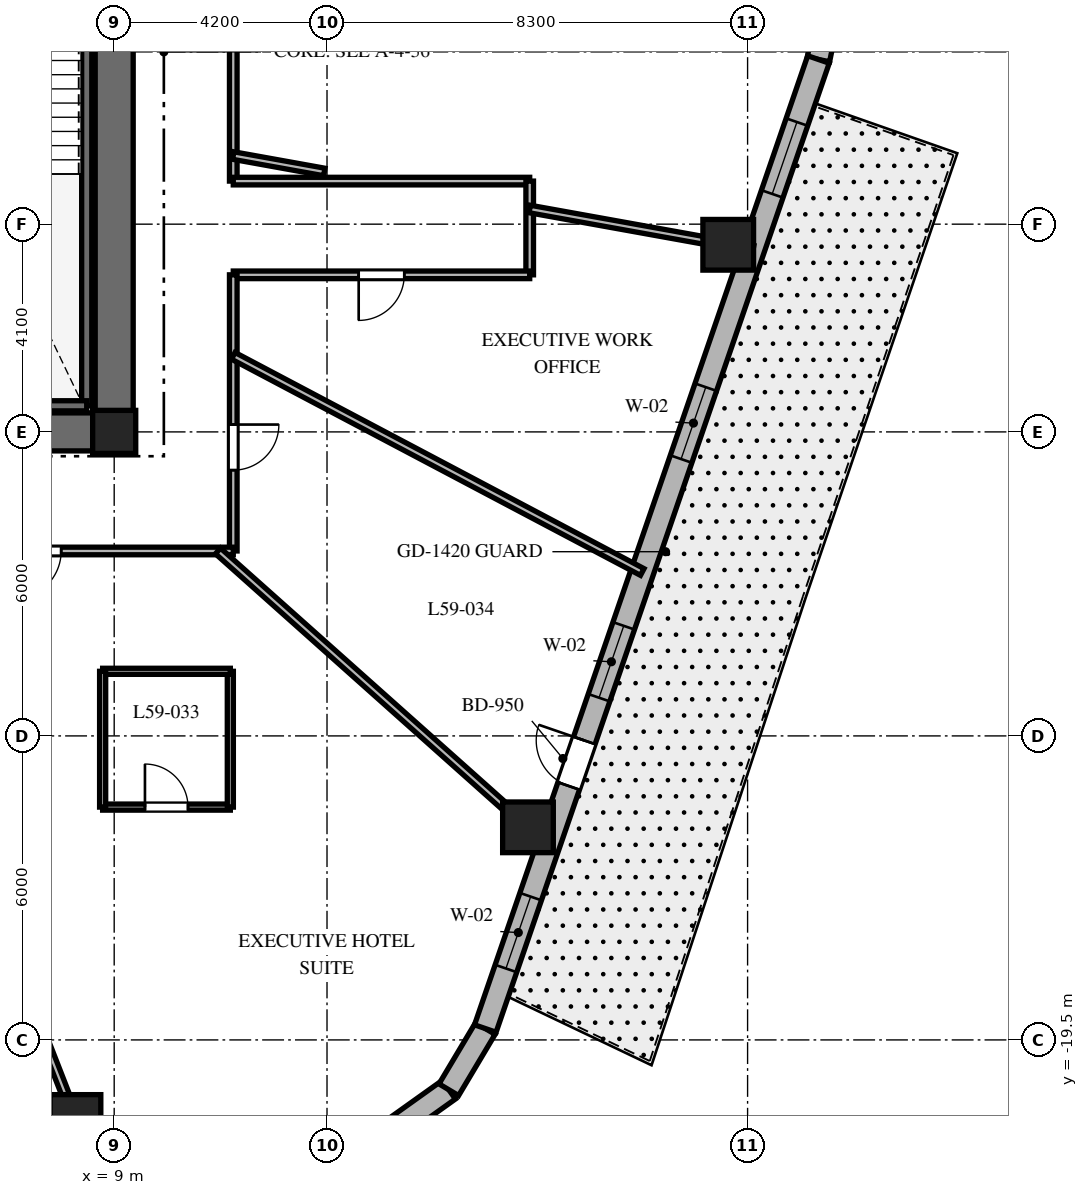
"""IFC4 building model, lengths in metres.
Left out: names, types, materials, properties, quantities, classifications, styles, units other than length and angle.
Written with IfcOpenShell. Run it as: python <this file> out.ifc"""

import sys

from ifc_helpers import new_model, si_unit, direction, frame, frame_2d, origin, origin_2d, place, context, subcontext, project, spatial, rectangle, extrude, element, fill, save


model = new_model("IFC4")
c1 = context("Model", 3, precision=1e-05, world=origin(), true_north=direction((0.0, 1.0)))
c2 = subcontext(c1, "Body", "Model", "MODEL_VIEW")
j1 = project(units=[si_unit("LENGTHUNIT", "METRE"), si_unit("PLANEANGLEUNIT", "RADIAN")], contexts=[c1])
p1 = place(None, origin())
s1 = spatial("IfcSite", under=j1, at=p1, CompositionType="ELEMENT")
p2 = place(p1, origin())
s2 = spatial("IfcBuilding", under=s1, at=p2, CompositionType="ELEMENT")
p3 = place(p2, frame((0.0, 0.0, 236.9)))
s3 = spatial("IfcBuildingStorey", under=s2, at=p3, CompositionType="ELEMENT", Elevation=236.9)
p4 = place(p3, frame((-9.375, -7.5, 0.0), z_axis=(0.0, 0.0, 1.0), x_axis=(1.0, 0.0, 0.0)))
e1 = element("IfcWall", 1, at=p4, inside=s3, PredefinedType="SHEAR", context=c2, shape_type="SweptSolid", body=[
    extrude(rectangle(XDim=18.75, YDim=0.75, at=frame_2d((9.375, 0.0))), origin(), (0.0, 0.0, 1.0), 3.8),
])
p5 = place(p4, frame((9.425, 0.0, 0.0)))
e2 = element("IfcOpeningElement", 2, at=p5, cuts=e1, PredefinedType="OPENING", context=c2, shape_type="SweptSolid", body=[
    extrude(rectangle(XDim=1.0, YDim=2.15, at=frame_2d((0.5, 1.075))), frame((0.0, 0.385, 0.0), z_axis=(0.0, -1.0, 0.0), x_axis=(1.0, 0.0, 0.0)), (0.0, 0.0, 1.0), 0.77),
])
p6 = place(p3, frame((9.0, -7.125, 0.0), z_axis=(0.0, 0.0, 1.0), x_axis=(0.0, 1.0, 0.0)))
e3 = element("IfcWall", 3, at=p6, inside=s3, PredefinedType="SHEAR", context=c2, shape_type="SweptSolid", body=[
    extrude(rectangle(XDim=14.25, YDim=0.75, at=frame_2d((7.125, 0.0))), origin(), (0.0, 0.0, 1.0), 3.8),
])
p7 = place(p6, frame((10.25, 0.0, 0.0)))
e4 = element("IfcOpeningElement", 4, at=p7, cuts=e3, PredefinedType="OPENING", context=c2, shape_type="SweptSolid", body=[
    extrude(rectangle(XDim=1.05, YDim=2.15, at=frame_2d((0.525, 1.075))), frame((0.0, 0.385, 0.0), z_axis=(0.0, -1.0, 0.0), x_axis=(1.0, 0.0, 0.0)), (0.0, 0.0, 1.0), 0.77),
])
p8 = place(p3, frame((8.458, -6.985, 0.0), z_axis=(0.0, 0.0, 1.0), x_axis=(0.0, 1.0, 0.0)))
e5 = element("IfcWall", 5, at=p8, inside=s3, PredefinedType="SHEAR", context=c2, shape_type="SweptSolid", body=[
    extrude(rectangle(XDim=9.143, YDim=0.2, at=frame_2d((4.572, 0.0))), origin(), (0.0, 0.0, 1.0), 3.8),
])
p9 = place(p3, frame((4.772, -6.985, 0.0), z_axis=(0.0, 0.0, 1.0), x_axis=(1.0, 0.0, 0.0)))
e6 = element("IfcWall", 6, at=p9, inside=s3, PredefinedType="SHEAR", context=c2, shape_type="SweptSolid", body=[
    extrude(rectangle(XDim=3.686, YDim=0.2, at=frame_2d((1.843, 0.0))), origin(), (0.0, 0.0, 1.0), 3.8),
])
p10 = place(p3, frame((9.0, -7.5, 0.0), z_axis=(0.0, 0.0, 1.0), x_axis=(1.0, 0.0, 0.0)))
e7 = element("IfcColumn", 7, at=p10, inside=s3, PredefinedType="COLUMN", context=c2, shape_type="SweptSolid", body=[
    extrude(rectangle(XDim=0.85, YDim=0.85, at=origin_2d()), origin(), (0.0, 0.0, 1.0), 3.8),
])
for number, where, z_axis, x_axis in (
    (8, (8.236, -21.08, 0.0), (0.0, 0.0, 1.0), (1.0, 0.0, 0.0)),
    (9, (17.166, -15.304, 0.0), (0.0, 0.0, 1.0), (1.0, 0.0, 0.0)),
    (10, (21.118, -3.807, 0.0), (0.0, 0.0, 1.0), (1.0, 0.0, 0.0)),
):
    element("IfcColumn", number, at=place(p3, frame(where, z_axis=z_axis, x_axis=x_axis)), inside=s3, PredefinedType="COLUMN", context=c2, shape_type="SweptSolid", body=[
        extrude(rectangle(XDim=1.0, YDim=1.0, at=origin_2d()), origin(), (0.0, 0.0, 1.0), 3.8),
    ])
p11 = place(p3, frame((14.478, -21.287, 0.0), z_axis=(0.0, 0.0, 1.0), x_axis=(0.813888518617, 0.58102106611, 0.0)))
e11 = element("IfcWall", 11, at=p11, inside=s3, PredefinedType="SOLIDWALL", context=c2, shape_type="SweptSolid", body=[
    extrude(rectangle(XDim=1.383, YDim=0.45, at=frame_2d((0.691, 0.0))), origin(), (0.0, 0.0, 1.0), 3.5),
])
p12 = place(p3, frame((15.604, -20.483, 0.0), z_axis=(0.0, 0.0, 1.0), x_axis=(0.512222149036, 0.858852996756, 0.0)))
e12 = element("IfcWall", 12, at=p12, inside=s3, PredefinedType="SOLIDWALL", context=c2, shape_type="SweptSolid", body=[
    extrude(rectangle(XDim=1.406, YDim=0.45, at=frame_2d((0.703, 0.0))), origin(), (0.0, 0.0, 1.0), 3.5),
])
p13 = place(p3, frame((22.898, -0.15, 0.0), z_axis=(0.0, 0.0, 1.0), x_axis=(0.199055826889, 0.979988151858, 0.0)))
e13 = element("IfcWall", 13, at=p13, inside=s3, PredefinedType="SOLIDWALL", context=c2, shape_type="SweptSolid", body=[
    extrude(rectangle(XDim=0.894, YDim=0.45, at=frame_2d((0.447, 0.0))), origin(), (0.0, 0.0, 1.0), 3.5),
])
p14 = place(p3, frame((16.324, -19.275, 0.0), z_axis=(0.0, 0.0, 1.0), x_axis=(0.325083142304, 0.945685439557, 0.0)))
e14 = element("IfcWall", 14, at=p14, inside=s3, PredefinedType="SOLIDWALL", context=c2, shape_type="SweptSolid", body=[
    extrude(rectangle(XDim=20.224, YDim=0.45, at=frame_2d((10.112, 0.0))), origin(), (0.0, 0.0, 1.0), 3.5),
])
p15 = place(p14, frame((5.062, 0.0, 0.0)))
e15 = element("IfcOpeningElement", 15, at=p15, cuts=e14, PredefinedType="OPENING", context=c2, shape_type="SweptSolid", body=[
    extrude(rectangle(XDim=0.95, YDim=2.15, at=frame_2d((0.475, 1.075))), frame((0.0, 0.235, 0.0), z_axis=(0.0, -1.0, 0.0), x_axis=(1.0, 0.0, 0.0)), (0.0, 0.0, 1.0), 0.47),
])
p16 = place(p14, frame((1.253, 0.0, 0.8)))
e16 = element("IfcOpeningElement", 16, at=p16, cuts=e14, PredefinedType="OPENING", context=c2, shape_type="SweptSolid", body=[
    extrude(rectangle(XDim=1.5, YDim=1.8, at=frame_2d((0.75, 0.9))), frame((0.0, 0.235, 0.0), z_axis=(0.0, -1.0, 0.0), x_axis=(1.0, 0.0, 0.0)), (0.0, 0.0, 1.0), 0.47),
])
p17 = place(p14, frame((6.904, 0.0, 0.8)))
e17 = element("IfcOpeningElement", 17, at=p17, cuts=e14, PredefinedType="OPENING", context=c2, shape_type="SweptSolid", body=[
    extrude(rectangle(XDim=1.5, YDim=1.8, at=frame_2d((0.75, 0.9))), frame((0.0, 0.235, 0.0), z_axis=(0.0, -1.0, 0.0), x_axis=(1.0, 0.0, 0.0)), (0.0, 0.0, 1.0), 0.47),
])
p18 = place(p14, frame((11.885, 0.0, 0.8)))
e18 = element("IfcOpeningElement", 18, at=p18, cuts=e14, PredefinedType="OPENING", context=c2, shape_type="SweptSolid", body=[
    extrude(rectangle(XDim=1.5, YDim=1.8, at=frame_2d((0.75, 0.9))), frame((0.0, 0.235, 0.0), z_axis=(0.0, -1.0, 0.0), x_axis=(1.0, 0.0, 0.0)), (0.0, 0.0, 1.0), 0.47),
])
p19 = place(p14, frame((17.418, 0.0, 0.8)))
e19 = element("IfcOpeningElement", 19, at=p19, cuts=e14, PredefinedType="OPENING", context=c2, shape_type="SweptSolid", body=[
    extrude(rectangle(XDim=1.5, YDim=1.8, at=frame_2d((0.75, 0.9))), frame((0.0, 0.235, 0.0), z_axis=(0.0, -1.0, 0.0), x_axis=(1.0, 0.0, 0.0)), (0.0, 0.0, 1.0), 0.47),
])
p20 = place(p3, frame((11.35, 9.85, 0.0), z_axis=(0.0, 0.0, 1.0), x_axis=(0.0, -1.0, 0.0)))
e20 = element("IfcWall", 20, at=p20, inside=s3, PredefinedType="PARTITIONING", context=c2, shape_type="SweptSolid", body=[
    extrude(rectangle(XDim=12.4, YDim=0.15, at=frame_2d((6.2, 0.0))), origin(), (0.0, 0.0, 1.0), 2.99),
])
p21 = place(p20, frame((4.191, 0.0, 0.0)))
e21 = element("IfcOpeningElement", 21, at=p21, cuts=e20, PredefinedType="OPENING", context=c2, shape_type="SweptSolid", body=[
    extrude(rectangle(XDim=0.95, YDim=2.03, at=frame_2d((0.475, 1.015))), frame((0.0, 0.085, 0.0), z_axis=(0.0, -1.0, 0.0), x_axis=(1.0, 0.0, 0.0)), (0.0, 0.0, 1.0), 0.17),
])
p22 = place(p20, frame((0.994, 0.0, 0.0)))
e22 = element("IfcOpeningElement", 22, at=p22, cuts=e20, PredefinedType="OPENING", context=c2, shape_type="SweptSolid", body=[
    extrude(rectangle(XDim=0.9, YDim=2.03, at=frame_2d((0.45, 1.015))), frame((0.0, 0.085, 0.0), z_axis=(0.0, -1.0, 0.0), x_axis=(1.0, 0.0, 0.0)), (0.0, 0.0, 1.0), 0.17),
])
p23 = place(p20, frame((8.835, 0.0, 0.0)))
e23 = element("IfcOpeningElement", 23, at=p23, cuts=e20, PredefinedType="OPENING", context=c2, shape_type="SweptSolid", body=[
    extrude(rectangle(XDim=0.95, YDim=2.03, at=frame_2d((0.475, 1.015))), frame((0.0, 0.085, 0.0), z_axis=(0.0, -1.0, 0.0), x_axis=(1.0, 0.0, 0.0)), (0.0, 0.0, 1.0), 0.17),
])
p24 = place(p3, frame((11.35, -2.55, 0.0), z_axis=(0.0, 0.0, 1.0), x_axis=(1.0, 0.0, 0.0)))
e24 = element("IfcWall", 24, at=p24, inside=s3, PredefinedType="PARTITIONING", context=c2, shape_type="SweptSolid", body=[
    extrude(rectangle(XDim=5.85, YDim=0.15, at=frame_2d((2.925, 0.0))), origin(), (0.0, 0.0, 1.0), 2.941),
])
p25 = place(p3, frame((17.2, -2.55, 0.0), z_axis=(0.0, 0.0, 1.0), x_axis=(0.0, -1.0, 0.0)))
e25 = element("IfcWall", 25, at=p25, inside=s3, PredefinedType="PARTITIONING", context=c2, shape_type="SweptSolid", body=[
    extrude(rectangle(XDim=1.85, YDim=0.15, at=frame_2d((0.925, 0.0))), origin(), (0.0, 0.0, 1.0), 2.941),
])
p26 = place(p3, frame((17.2, -4.4, 0.0), z_axis=(0.0, 0.0, 1.0), x_axis=(-1.0, 0.0, 0.0)))
e26 = element("IfcWall", 26, at=p26, inside=s3, PredefinedType="PARTITIONING", context=c2, shape_type="SweptSolid", body=[
    extrude(rectangle(XDim=5.85, YDim=0.15, at=frame_2d((2.925, 0.0))), origin(), (0.0, 0.0, 1.0), 2.941),
])
p27 = place(p26, frame((2.475, 0.0, 0.0)))
e27 = element("IfcOpeningElement", 27, at=p27, cuts=e26, PredefinedType="OPENING", context=c2, shape_type="SweptSolid", body=[
    extrude(rectangle(XDim=0.9, YDim=2.03, at=frame_2d((0.45, 1.015))), frame((0.0, 0.085, 0.0), z_axis=(0.0, -1.0, 0.0), x_axis=(1.0, 0.0, 0.0)), (0.0, 0.0, 1.0), 0.17),
])
p28 = place(p3, frame((11.35, -4.4, 0.0), z_axis=(0.0, 0.0, 1.0), x_axis=(0.0, -1.0, 0.0)))
e28 = element("IfcWall", 28, at=p28, inside=s3, PredefinedType="PARTITIONING", context=c2, shape_type="SweptSolid", body=[
    extrude(rectangle(XDim=5.45, YDim=0.15, at=frame_2d((2.725, 0.0))), origin(), (0.0, 0.0, 1.0), 2.99),
])
p29 = place(p28, frame((2.955, 0.0, 0.0)))
e29 = element("IfcOpeningElement", 29, at=p29, cuts=e28, PredefinedType="OPENING", context=c2, shape_type="SweptSolid", body=[
    extrude(rectangle(XDim=0.9, YDim=2.03, at=frame_2d((0.45, 1.015))), frame((0.0, 0.085, 0.0), z_axis=(0.0, -1.0, 0.0), x_axis=(1.0, 0.0, 0.0)), (0.0, 0.0, 1.0), 0.17),
])
p30 = place(p3, frame((11.35, -9.85, 0.0), z_axis=(0.0, 0.0, 1.0), x_axis=(-1.0, 0.0, 0.0)))
e30 = element("IfcWall", 30, at=p30, inside=s3, PredefinedType="PARTITIONING", context=c2, shape_type="SweptSolid", body=[
    extrude(rectangle(XDim=10.43, YDim=0.15, at=frame_2d((5.215, 0.0))), origin(), (0.0, 0.0, 1.0), 2.99),
])
p31 = place(p30, frame((8.362, 0.0, 0.0)))
e31 = element("IfcOpeningElement", 31, at=p31, cuts=e30, PredefinedType="OPENING", context=c2, shape_type="SweptSolid", body=[
    extrude(rectangle(XDim=0.95, YDim=2.03, at=frame_2d((0.475, 1.015))), frame((0.0, 0.085, 0.0), z_axis=(0.0, -1.0, 0.0), x_axis=(1.0, 0.0, 0.0)), (0.0, 0.0, 1.0), 0.17),
])
p32 = place(p30, frame((3.396, 0.0, 0.0)))
e32 = element("IfcOpeningElement", 32, at=p32, cuts=e30, PredefinedType="OPENING", context=c2, shape_type="SweptSolid", body=[
    extrude(rectangle(XDim=0.95, YDim=2.03, at=frame_2d((0.475, 1.015))), frame((0.0, 0.085, 0.0), z_axis=(0.0, -1.0, 0.0), x_axis=(1.0, 0.0, 0.0)), (0.0, 0.0, 1.0), 0.17),
])
p33 = place(p3, frame((3.848, -9.85, 0.0), z_axis=(0.0, 0.0, 1.0), x_axis=(0.363921778212, -0.931429513889, 0.0)))
e33 = element("IfcWall", 33, at=p33, inside=s3, PredefinedType="PARTITIONING", context=c2, shape_type="SweptSolid", body=[
    extrude(rectangle(XDim=12.588, YDim=0.15, at=frame_2d((6.294, 0.0))), origin(), (0.0, 0.0, 1.0), 2.74),
])
p34 = place(p3, frame((11.048, -9.85, 0.0), z_axis=(0.0, 0.0, 1.0), x_axis=(0.746444434655, -0.665447748492, 0.0)))
e34 = element("IfcWall", 34, at=p34, inside=s3, PredefinedType="PARTITIONING", context=c2, shape_type="SweptSolid", body=[
    extrude(rectangle(XDim=8.732, YDim=0.15, at=frame_2d((4.366, 0.0))), origin(), (0.0, 0.0, 1.0), 2.74),
])
p35 = place(p3, frame((11.35, -5.999, 0.0), z_axis=(0.0, 0.0, 1.0), x_axis=(0.884112301724, -0.467274478161, 0.0)))
e35 = element("IfcWall", 35, at=p35, inside=s3, PredefinedType="PARTITIONING", context=c2, shape_type="SweptSolid", body=[
    extrude(rectangle(XDim=9.129, YDim=0.15, at=frame_2d((4.564, 0.0))), origin(), (0.0, 0.0, 1.0), 2.74),
])
p36 = place(p3, frame((11.35, -2.046, 0.0), z_axis=(0.0, 0.0, 1.0), x_axis=(0.984127783205, -0.177461281195, 0.0)))
e36 = element("IfcWall", 36, at=p36, inside=s3, PredefinedType="PARTITIONING", context=c2, shape_type="SweptSolid", body=[
    extrude(rectangle(XDim=1.826, YDim=0.15, at=frame_2d((0.913, 0.0))), origin(), (0.0, 0.0, 1.0), 3.5),
])
p37 = place(p3, frame((17.2, -3.101, 0.0), z_axis=(0.0, 0.0, 1.0), x_axis=(0.98413465883, -0.177423147559, 0.0)))
e37 = element("IfcWall", 37, at=p37, inside=s3, PredefinedType="PARTITIONING", context=c2, shape_type="SweptSolid", body=[
    extrude(rectangle(XDim=4.482, YDim=0.15, at=frame_2d((2.241, 0.0))), origin(), (0.0, 0.0, 1.0), 2.74),
])
p38 = place(p3, frame((8.772, -14.905, 0.0), z_axis=(0.0, 0.0, 1.0), x_axis=(1.0, 0.0, 0.0)))
e38 = element("IfcWall", 38, at=p38, inside=s3, PredefinedType="PARTITIONING", context=c2, shape_type="SweptSolid", body=[
    extrude(rectangle(XDim=2.52, YDim=0.12, at=frame_2d((1.26, 0.0))), origin(), (0.0, 0.0, 1.0), 3.027),
])
p39 = place(p38, frame((0.835, 0.0, 0.0)))
e39 = element("IfcOpeningElement", 39, at=p39, cuts=e38, PredefinedType="OPENING", context=c2, shape_type="SweptSolid", body=[
    extrude(rectangle(XDim=0.85, YDim=2.03, at=frame_2d((0.425, 1.015))), frame((0.0, 0.07, 0.0), z_axis=(0.0, -1.0, 0.0), x_axis=(1.0, 0.0, 0.0)), (0.0, 0.0, 1.0), 0.14),
])
p40 = place(p3, frame((11.292, -14.905, 0.0), z_axis=(0.0, 0.0, 1.0), x_axis=(0.0, 1.0, 0.0)))
e40 = element("IfcWall", 40, at=p40, inside=s3, PredefinedType="PARTITIONING", context=c2, shape_type="SweptSolid", body=[
    extrude(rectangle(XDim=2.68, YDim=0.12, at=frame_2d((1.34, 0.0))), origin(), (0.0, 0.0, 1.0), 3.027),
])
p41 = place(p3, frame((11.292, -12.225, 0.0), z_axis=(0.0, 0.0, 1.0), x_axis=(-1.0, 0.0, 0.0)))
e41 = element("IfcWall", 41, at=p41, inside=s3, PredefinedType="PARTITIONING", context=c2, shape_type="SweptSolid", body=[
    extrude(rectangle(XDim=2.52, YDim=0.12, at=frame_2d((1.26, 0.0))), origin(), (0.0, 0.0, 1.0), 2.99),
])
p42 = place(p3, frame((8.772, -12.225, 0.0), z_axis=(0.0, 0.0, 1.0), x_axis=(0.0, -1.0, 0.0)))
e42 = element("IfcWall", 42, at=p42, inside=s3, PredefinedType="PARTITIONING", context=c2, shape_type="SweptSolid", body=[
    extrude(rectangle(XDim=2.68, YDim=0.12, at=frame_2d((1.34, 0.0))), origin(), (0.0, 0.0, 1.0), 2.99),
])
p43 = place(p15, origin())
e43 = element("IfcDoor", 43, at=p43, inside=s3, OperationType="SINGLE_SWING_RIGHT", PredefinedType="DOOR", context=c2, shape_type="SweptSolid", body=[
    extrude(rectangle(XDim=0.95, YDim=2.15, at=frame_2d((0.475, 1.075))), frame((0.0, 0.025, 0.0), z_axis=(0.0, -1.0, 0.0), x_axis=(1.0, 0.0, 0.0)), (0.0, 0.0, 1.0), 0.05),
])
fill(e15, e43)
p44 = place(p16, origin())
e44 = element("IfcWindow", 44, at=p44, inside=s3, PartitioningType="SINGLE_PANEL", PredefinedType="WINDOW", context=c2, shape_type="SweptSolid", body=[
    extrude(rectangle(XDim=1.5, YDim=1.8, at=frame_2d((0.75, 0.9))), frame((0.0, 0.03, 0.0), z_axis=(0.0, -1.0, 0.0), x_axis=(1.0, 0.0, 0.0)), (0.0, 0.0, 1.0), 0.06),
])
fill(e16, e44)
p45 = place(p17, origin())
e45 = element("IfcWindow", 45, at=p45, inside=s3, PartitioningType="SINGLE_PANEL", PredefinedType="WINDOW", context=c2, shape_type="SweptSolid", body=[
    extrude(rectangle(XDim=1.5, YDim=1.8, at=frame_2d((0.75, 0.9))), frame((0.0, 0.03, 0.0), z_axis=(0.0, -1.0, 0.0), x_axis=(1.0, 0.0, 0.0)), (0.0, 0.0, 1.0), 0.06),
])
fill(e17, e45)
p46 = place(p18, origin())
e46 = element("IfcWindow", 46, at=p46, inside=s3, PartitioningType="SINGLE_PANEL", PredefinedType="WINDOW", context=c2, shape_type="SweptSolid", body=[
    extrude(rectangle(XDim=1.5, YDim=1.8, at=frame_2d((0.75, 0.9))), frame((0.0, 0.03, 0.0), z_axis=(0.0, -1.0, 0.0), x_axis=(1.0, 0.0, 0.0)), (0.0, 0.0, 1.0), 0.06),
])
fill(e18, e46)
p47 = place(p19, origin())
e47 = element("IfcWindow", 47, at=p47, inside=s3, PartitioningType="SINGLE_PANEL", PredefinedType="WINDOW", context=c2, shape_type="SweptSolid", body=[
    extrude(rectangle(XDim=1.5, YDim=1.8, at=frame_2d((0.75, 0.9))), frame((0.0, 0.03, 0.0), z_axis=(0.0, -1.0, 0.0), x_axis=(1.0, 0.0, 0.0)), (0.0, 0.0, 1.0), 0.06),
])
fill(e19, e47)
p48 = place(p32, origin())
e48 = element("IfcDoor", 48, at=p48, inside=s3, OperationType="SINGLE_SWING_RIGHT", PredefinedType="DOOR", context=c2, shape_type="SweptSolid", body=[
    extrude(rectangle(XDim=0.95, YDim=2.03, at=frame_2d((0.475, 1.015))), frame((0.0, 0.025, 0.0), z_axis=(0.0, -1.0, 0.0), x_axis=(1.0, 0.0, 0.0)), (0.0, 0.0, 1.0), 0.05),
])
fill(e32, e48)
p49 = place(p39, origin())
e49 = element("IfcDoor", 49, at=p49, inside=s3, OperationType="SINGLE_SWING_LEFT", PredefinedType="DOOR", context=c2, shape_type="SweptSolid", body=[
    extrude(rectangle(XDim=0.85, YDim=2.03, at=frame_2d((0.425, 1.015))), frame((0.0, 0.025, 0.0), z_axis=(0.0, -1.0, 0.0), x_axis=(1.0, 0.0, 0.0)), (0.0, 0.0, 1.0), 0.05),
])
fill(e39, e49)
p50 = place(p29, origin())
e50 = element("IfcDoor", 50, at=p50, inside=s3, OperationType="SINGLE_SWING_LEFT", PredefinedType="DOOR", context=c2, shape_type="SweptSolid", body=[
    extrude(rectangle(XDim=0.9, YDim=2.03, at=frame_2d((0.45, 1.015))), frame((0.0, 0.025, 0.0), z_axis=(0.0, -1.0, 0.0), x_axis=(1.0, 0.0, 0.0)), (0.0, 0.0, 1.0), 0.05),
])
fill(e29, e50)
p51 = place(p27, origin())
e51 = element("IfcDoor", 51, at=p51, inside=s3, OperationType="SINGLE_SWING_RIGHT", PredefinedType="DOOR", context=c2, shape_type="SweptSolid", body=[
    extrude(rectangle(XDim=0.9, YDim=2.03, at=frame_2d((0.45, 1.015))), frame((0.0, 0.025, 0.0), z_axis=(0.0, -1.0, 0.0), x_axis=(1.0, 0.0, 0.0)), (0.0, 0.0, 1.0), 0.05),
])
fill(e27, e51)
save(model, sys.argv[1])
